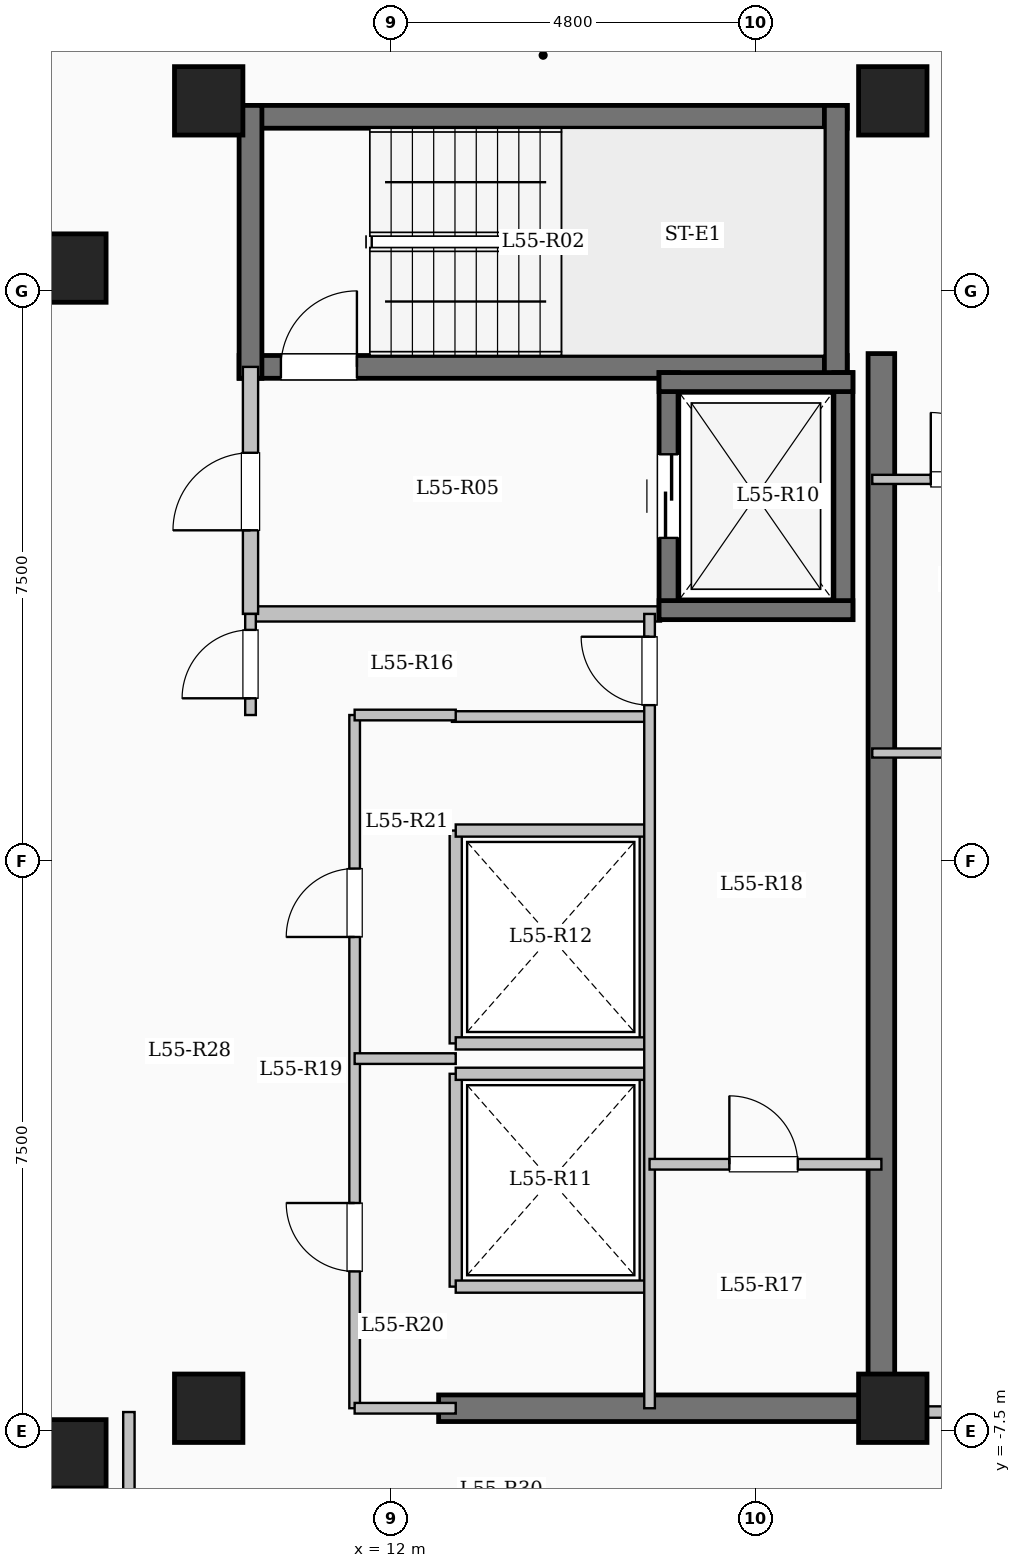
"""IFC4 building model, lengths in metres.
Left out: names, types, materials, properties, quantities, classifications, styles, units other than length and angle.
Written with IfcOpenShell. Run it as: python <this file> out.ifc"""

import sys

from ifc_helpers import new_model, si_unit, direction, frame, frame_2d, origin, origin_2d, place, context, subcontext, project, spatial, rectangle, extrude, element, fill, save


model = new_model("IFC4")
c1 = context("Model", 3, precision=1e-05, world=origin(), true_north=direction((0.0, 1.0)))
c2 = subcontext(c1, "Body", "Model", "MODEL_VIEW")
j1 = project(units=[si_unit("LENGTHUNIT", "METRE"), si_unit("PLANEANGLEUNIT", "RADIAN")], contexts=[c1])
p1 = place(None, origin())
s1 = spatial("IfcSite", under=j1, at=p1, CompositionType="ELEMENT")
p2 = place(p1, origin())
s2 = spatial("IfcBuilding", under=s1, at=p2, CompositionType="ELEMENT")
p3 = place(p2, frame((0.0, 0.0, 203.65)))
s3 = spatial("IfcBuildingStorey", under=s2, at=p3, CompositionType="ELEMENT", Elevation=203.65)
for number, where, z_axis, x_axis in (
    (1, (7.8, -7.8, 0.0), (0.0, 0.0, 1.0), (1.0, 0.0, 0.0)),
    (2, (7.8, 7.8, 0.0), (0.0, 0.0, 1.0), (1.0, 0.0, 0.0)),
    (3, (9.6, -7.2, 0.0), (0.0, 0.0, 1.0), (1.0, 0.0, 0.0)),
    (4, (9.6, 10.0, 0.0), (0.0, 0.0, 1.0), (1.0, 0.0, 0.0)),
    (5, (18.6, -7.2, 0.0), (0.0, 0.0, 1.0), (1.0, 0.0, 0.0)),
    (6, (18.6, 10.0, 0.0), (0.0, 0.0, 1.0), (1.0, 0.0, 0.0)),
):
    element("IfcColumn", number, at=place(p3, frame(where, z_axis=z_axis, x_axis=x_axis)), inside=s3, PredefinedType="COLUMN", context=c2, shape_type="SweptSolid", body=[
        extrude(rectangle(XDim=0.9, YDim=0.9, at=origin_2d()), origin(), (0.0, 0.0, 1.0), 3.35),
    ])
p4 = place(p3, frame((10.0, 9.79, 0.0), z_axis=(0.0, 0.0, 1.0), x_axis=(1.0, 0.0, 0.0)))
e7 = element("IfcWall", 7, at=p4, inside=s3, PredefinedType="SHEAR", context=c2, shape_type="SweptSolid", body=[
    extrude(rectangle(XDim=8.0, YDim=0.3, at=frame_2d((4.0, 0.0))), origin(), (0.0, 0.0, 1.0), 3.35),
])
p5 = place(p3, frame((10.0, 6.5, 0.0), z_axis=(0.0, 0.0, 1.0), x_axis=(1.0, 0.0, 0.0)))
e8 = element("IfcWall", 8, at=p5, inside=s3, PredefinedType="SHEAR", context=c2, shape_type="SweptSolid", body=[
    extrude(rectangle(XDim=8.0, YDim=0.3, at=frame_2d((4.0, 0.0))), origin(), (0.0, 0.0, 1.0), 3.35),
])
p6 = place(p5, frame((0.55, 0.0, 0.0)))
e9 = element("IfcOpeningElement", 9, at=p6, cuts=e8, PredefinedType="OPENING", context=c2, shape_type="SweptSolid", body=[
    extrude(rectangle(XDim=1.0, YDim=2.15, at=frame_2d((0.5, 1.075))), frame((0.0, 0.16, 0.0), z_axis=(0.0, -1.0, 0.0), x_axis=(1.0, 0.0, 0.0)), (0.0, 0.0, 1.0), 0.32),
])
for number, where, z_axis, x_axis in (
    (10, (10.15, 6.35, 0.0), (0.0, 0.0, 1.0), (0.0, 1.0, 0.0)),
    (11, (17.85, 6.35, 0.0), (0.0, 0.0, 1.0), (0.0, 1.0, 0.0)),
):
    element("IfcWall", number, at=place(p3, frame(where, z_axis=z_axis, x_axis=x_axis)), inside=s3, PredefinedType="SHEAR", context=c2, shape_type="SweptSolid", body=[
        extrude(rectangle(XDim=3.59, YDim=0.3, at=frame_2d((1.795, 0.0))), origin(), (0.0, 0.0, 1.0), 3.35),
    ])
p7 = place(p3, frame((10.15, 3.25, 0.0), z_axis=(0.0, 0.0, 1.0), x_axis=(1.0, 0.0, 0.0)))
e12 = element("IfcWall", 12, at=p7, inside=s3, PredefinedType="SOLIDWALL", context=c2, shape_type="SweptSolid", body=[
    extrude(rectangle(XDim=5.4, YDim=0.2, at=frame_2d((2.7, 0.0))), origin(), (0.0, 0.0, 1.0), 3.1),
])
p8 = place(p3, frame((10.15, 3.25, 0.0), z_axis=(0.0, 0.0, 1.0), x_axis=(0.0, 1.0, 0.0)))
e13 = element("IfcWall", 13, at=p8, inside=s3, PredefinedType="SOLIDWALL", context=c2, shape_type="SweptSolid", body=[
    extrude(rectangle(XDim=3.25, YDim=0.2, at=frame_2d((1.625, 0.0))), origin(), (0.0, 0.0, 1.0), 3.1),
])
p9 = place(p8, frame((1.1, 0.0, 0.0)))
e14 = element("IfcOpeningElement", 14, at=p9, cuts=e13, PredefinedType="OPENING", context=c2, shape_type="SweptSolid", body=[
    extrude(rectangle(XDim=1.02, YDim=2.15, at=frame_2d((0.51, 1.075))), frame((0.0, 0.11, 0.0), z_axis=(0.0, -1.0, 0.0), x_axis=(1.0, 0.0, 0.0)), (0.0, 0.0, 1.0), 0.22),
])
p10 = place(p3, frame((15.65, 3.175, 0.0), z_axis=(0.0, 0.0, 1.0), x_axis=(0.0, 1.0, 0.0)))
e15 = element("IfcWall", 15, at=p10, inside=s3, PredefinedType="SHEAR", context=c2, shape_type="SweptSolid", body=[
    extrude(rectangle(XDim=3.25, YDim=0.25, at=frame_2d((1.625, 0.0))), origin(), (0.0, 0.0, 1.0), 3.35),
])
p11 = place(p10, frame((1.075, 0.0, 0.0)))
e16 = element("IfcOpeningElement", 16, at=p11, cuts=e15, PredefinedType="OPENING", context=c2, shape_type="SweptSolid", body=[
    extrude(rectangle(XDim=1.1, YDim=2.15, at=frame_2d((0.55, 1.075))), frame((0.0, 0.135, 0.0), z_axis=(0.0, -1.0, 0.0), x_axis=(1.0, 0.0, 0.0)), (0.0, 0.0, 1.0), 0.27),
])
p12 = place(p3, frame((17.95, 3.175, 0.0), z_axis=(0.0, 0.0, 1.0), x_axis=(0.0, 1.0, 0.0)))
e17 = element("IfcWall", 17, at=p12, inside=s3, PredefinedType="SHEAR", context=c2, shape_type="SweptSolid", body=[
    extrude(rectangle(XDim=3.25, YDim=0.25, at=frame_2d((1.625, 0.0))), origin(), (0.0, 0.0, 1.0), 3.35),
])
for number, where, z_axis, x_axis in (
    (18, (15.525, 3.3, 0.0), (0.0, 0.0, 1.0), (1.0, 0.0, 0.0)),
    (19, (15.525, 6.3, 0.0), (0.0, 0.0, 1.0), (1.0, 0.0, 0.0)),
):
    element("IfcWall", number, at=place(p3, frame(where, z_axis=z_axis, x_axis=x_axis)), inside=s3, PredefinedType="SHEAR", context=c2, shape_type="SweptSolid", body=[
        extrude(rectangle(XDim=2.55, YDim=0.25, at=frame_2d((1.275, 0.0))), origin(), (0.0, 0.0, 1.0), 3.35),
    ])
for number, where, z_axis, x_axis in (
    (20, (12.85, -5.6, 0.0), (0.0, 0.0, 1.0), (0.0, 1.0, 0.0)),
    (21, (15.35, -5.6, 0.0), (0.0, 0.0, 1.0), (0.0, 1.0, 0.0)),
):
    element("IfcWall", number, at=place(p3, frame(where, z_axis=z_axis, x_axis=x_axis)), inside=s3, PredefinedType="SOLIDWALL", context=c2, shape_type="SweptSolid", body=[
        extrude(rectangle(XDim=2.8, YDim=0.16, at=frame_2d((1.4, 0.0))), origin(), (0.0, 0.0, 1.0), 3.1),
    ])
for number, where, z_axis, x_axis in (
    (22, (12.85, -5.6, 0.0), (0.0, 0.0, 1.0), (1.0, 0.0, 0.0)),
    (23, (12.85, -2.8, 0.0), (0.0, 0.0, 1.0), (1.0, 0.0, 0.0)),
):
    element("IfcWall", number, at=place(p3, frame(where, z_axis=z_axis, x_axis=x_axis)), inside=s3, PredefinedType="SOLIDWALL", context=c2, shape_type="SweptSolid", body=[
        extrude(rectangle(XDim=2.5, YDim=0.16, at=frame_2d((1.25, 0.0))), origin(), (0.0, 0.0, 1.0), 3.1),
    ])
for number, where, z_axis, x_axis in (
    (24, (12.85, -2.4, 0.0), (0.0, 0.0, 1.0), (0.0, 1.0, 0.0)),
    (25, (15.35, -2.4, 0.0), (0.0, 0.0, 1.0), (0.0, 1.0, 0.0)),
):
    element("IfcWall", number, at=place(p3, frame(where, z_axis=z_axis, x_axis=x_axis)), inside=s3, PredefinedType="SOLIDWALL", context=c2, shape_type="SweptSolid", body=[
        extrude(rectangle(XDim=2.8, YDim=0.16, at=frame_2d((1.4, 0.0))), origin(), (0.0, 0.0, 1.0), 3.1),
    ])
for number, where, z_axis, x_axis in (
    (26, (12.85, -2.4, 0.0), (0.0, 0.0, 1.0), (1.0, 0.0, 0.0)),
    (27, (12.85, 0.4, 0.0), (0.0, 0.0, 1.0), (1.0, 0.0, 0.0)),
):
    element("IfcWall", number, at=place(p3, frame(where, z_axis=z_axis, x_axis=x_axis)), inside=s3, PredefinedType="SOLIDWALL", context=c2, shape_type="SweptSolid", body=[
        extrude(rectangle(XDim=2.5, YDim=0.16, at=frame_2d((1.25, 0.0))), origin(), (0.0, 0.0, 1.0), 3.1),
    ])
p13 = place(p3, frame((18.45, -7.375, 0.0), z_axis=(0.0, 0.0, 1.0), x_axis=(0.0, 1.0, 0.0)))
e28 = element("IfcWall", 28, at=p13, inside=s3, PredefinedType="SHEAR", context=c2, shape_type="SweptSolid", body=[
    extrude(rectangle(XDim=14.05, YDim=0.35, at=frame_2d((7.025, 0.0))), origin(), (0.0, 0.0, 1.0), 3.35),
])
p14 = place(p3, frame((12.625, -7.2, 0.0), z_axis=(0.0, 0.0, 1.0), x_axis=(1.0, 0.0, 0.0)))
e29 = element("IfcWall", 29, at=p14, inside=s3, PredefinedType="SHEAR", context=c2, shape_type="SweptSolid", body=[
    extrude(rectangle(XDim=6.0, YDim=0.35, at=frame_2d((3.0, 0.0))), origin(), (0.0, 0.0, 1.0), 3.35),
])
p15 = place(p3, frame((12.8, 1.9, 0.0), z_axis=(0.0, 0.0, 1.0), x_axis=(1.0, 0.0, 0.0)))
e30 = element("IfcWall", 30, at=p15, inside=s3, PredefinedType="PARTITIONING", context=c2, shape_type="SweptSolid", body=[
    extrude(rectangle(XDim=2.6, YDim=0.14, at=frame_2d((1.3, 0.0))), origin(), (0.0, 0.0, 1.0), 3.1),
])
p16 = place(p3, frame((10.15, 1.92, 0.0), z_axis=(0.0, 0.0, 1.0), x_axis=(0.0, 1.0, 0.0)))
e31 = element("IfcWall", 31, at=p16, inside=s3, PredefinedType="PARTITIONING", context=c2, shape_type="SweptSolid", body=[
    extrude(rectangle(XDim=1.33, YDim=0.14, at=frame_2d((0.665, 0.0))), origin(), (0.0, 0.0, 1.0), 3.1),
])
p17 = place(p16, frame((0.22, 0.0, 0.0)))
e32 = element("IfcOpeningElement", 32, at=p17, cuts=e31, PredefinedType="OPENING", context=c2, shape_type="SweptSolid", body=[
    extrude(rectangle(XDim=0.9, YDim=2.08, at=frame_2d((0.45, 1.04))), frame((0.0, 0.08, 0.0), z_axis=(0.0, -1.0, 0.0), x_axis=(1.0, 0.0, 0.0)), (0.0, 0.0, 1.0), 0.16),
])
p18 = place(p3, frame((15.4, -7.2, 0.0), z_axis=(0.0, 0.0, 1.0), x_axis=(0.0, 1.0, 0.0)))
e33 = element("IfcWall", 33, at=p18, inside=s3, PredefinedType="PARTITIONING", context=c2, shape_type="SweptSolid", body=[
    extrude(rectangle(XDim=10.45, YDim=0.14, at=frame_2d((5.225, 0.0))), origin(), (0.0, 0.0, 1.0), 3.1),
])
p19 = place(p18, frame((9.25, 0.0, 0.0)))
e34 = element("IfcOpeningElement", 34, at=p19, cuts=e33, PredefinedType="OPENING", context=c2, shape_type="SweptSolid", body=[
    extrude(rectangle(XDim=0.9, YDim=2.08, at=frame_2d((0.45, 1.04))), frame((0.0, 0.08, 0.0), z_axis=(0.0, -1.0, 0.0), x_axis=(1.0, 0.0, 0.0)), (0.0, 0.0, 1.0), 0.16),
])
p20 = place(p3, frame((15.4, -3.99, 0.0), z_axis=(0.0, 0.0, 1.0), x_axis=(1.0, 0.0, 0.0)))
e35 = element("IfcWall", 35, at=p20, inside=s3, PredefinedType="PARTITIONING", context=c2, shape_type="SweptSolid", body=[
    extrude(rectangle(XDim=3.05, YDim=0.14, at=frame_2d((1.525, 0.0))), origin(), (0.0, 0.0, 1.0), 3.1),
])
p21 = place(p20, frame((1.05, 0.0, 0.0)))
e36 = element("IfcOpeningElement", 36, at=p21, cuts=e35, PredefinedType="OPENING", context=c2, shape_type="SweptSolid", body=[
    extrude(rectangle(XDim=0.9, YDim=2.08, at=frame_2d((0.45, 1.04))), frame((0.0, 0.08, 0.0), z_axis=(0.0, -1.0, 0.0), x_axis=(1.0, 0.0, 0.0)), (0.0, 0.0, 1.0), 0.16),
])
p22 = place(p3, frame((11.52, -7.2, 0.0), z_axis=(0.0, 0.0, 1.0), x_axis=(0.0, 1.0, 0.0)))
e37 = element("IfcWall", 37, at=p22, inside=s3, PredefinedType="PARTITIONING", context=c2, shape_type="SweptSolid", body=[
    extrude(rectangle(XDim=9.12, YDim=0.14, at=frame_2d((4.56, 0.0))), origin(), (0.0, 0.0, 1.0), 3.1),
])
p23 = place(p22, frame((1.8, 0.0, 0.0)))
e38 = element("IfcOpeningElement", 38, at=p23, cuts=e37, PredefinedType="OPENING", context=c2, shape_type="SweptSolid", body=[
    extrude(rectangle(XDim=0.9, YDim=2.08, at=frame_2d((0.45, 1.04))), frame((0.0, 0.08, 0.0), z_axis=(0.0, -1.0, 0.0), x_axis=(1.0, 0.0, 0.0)), (0.0, 0.0, 1.0), 0.16),
])
p24 = place(p22, frame((6.2, 0.0, 0.0)))
e39 = element("IfcOpeningElement", 39, at=p24, cuts=e37, PredefinedType="OPENING", context=c2, shape_type="SweptSolid", body=[
    extrude(rectangle(XDim=0.9, YDim=2.08, at=frame_2d((0.45, 1.04))), frame((0.0, 0.08, 0.0), z_axis=(0.0, -1.0, 0.0), x_axis=(1.0, 0.0, 0.0)), (0.0, 0.0, 1.0), 0.16),
])
p25 = place(p3, frame((11.52, 1.92, 0.0), z_axis=(0.0, 0.0, 1.0), x_axis=(1.0, 0.0, 0.0)))
e40 = element("IfcWall", 40, at=p25, inside=s3, PredefinedType="PARTITIONING", context=c2, shape_type="SweptSolid", body=[
    extrude(rectangle(XDim=1.33, YDim=0.14, at=frame_2d((0.665, 0.0))), origin(), (0.0, 0.0, 1.0), 3.1),
])
p26 = place(p3, frame((11.52, -7.2, 0.0), z_axis=(0.0, 0.0, 1.0), x_axis=(1.0, 0.0, 0.0)))
e41 = element("IfcWall", 41, at=p26, inside=s3, PredefinedType="PARTITIONING", context=c2, shape_type="SweptSolid", body=[
    extrude(rectangle(XDim=1.33, YDim=0.14, at=frame_2d((0.665, 0.0))), origin(), (0.0, 0.0, 1.0), 2.235),
])
p27 = place(p3, frame((11.52, -2.6, 0.0), z_axis=(0.0, 0.0, 1.0), x_axis=(1.0, 0.0, 0.0)))
e42 = element("IfcWall", 42, at=p27, inside=s3, PredefinedType="PARTITIONING", context=c2, shape_type="SweptSolid", body=[
    extrude(rectangle(XDim=1.33, YDim=0.14, at=frame_2d((0.665, 0.0))), origin(), (0.0, 0.0, 1.0), 3.1),
])
p28 = place(p3, frame((8.55, -9.4, 0.0), z_axis=(0.0, 0.0, 1.0), x_axis=(0.0, 1.0, 0.0)))
e43 = element("IfcWall", 43, at=p28, inside=s3, PredefinedType="PARTITIONING", context=c2, shape_type="SweptSolid", body=[
    extrude(rectangle(XDim=2.15, YDim=0.15, at=frame_2d((1.075, 0.0))), origin(), (0.0, 0.0, 1.0), 3.1),
])
p29 = place(p3, frame((18.45, -7.25, 0.0), z_axis=(0.0, 0.0, 1.0), x_axis=(1.0, 0.0, 0.0)))
e44 = element("IfcWall", 44, at=p29, inside=s3, PredefinedType="PARTITIONING", context=c2, shape_type="SweptSolid", body=[
    extrude(rectangle(XDim=5.13, YDim=0.15, at=frame_2d((2.565, 0.0))), origin(), (0.0, 0.0, 1.0), 3.1),
])
p30 = place(p29, frame((1.95, 0.0, 0.0)))
e45 = element("IfcOpeningElement", 45, at=p30, cuts=e44, PredefinedType="OPENING", context=c2, shape_type="SweptSolid", body=[
    extrude(rectangle(XDim=0.96, YDim=2.15, at=frame_2d((0.48, 1.075))), frame((0.0, 0.085, 0.0), z_axis=(0.0, -1.0, 0.0), x_axis=(1.0, 0.0, 0.0)), (0.0, 0.0, 1.0), 0.17),
])
p31 = place(p3, frame((18.33, 1.42, 0.0), z_axis=(0.0, 0.0, 1.0), x_axis=(1.0, 0.0, 0.0)))
e46 = element("IfcWall", 46, at=p31, inside=s3, PredefinedType="PARTITIONING", context=c2, shape_type="SweptSolid", body=[
    extrude(rectangle(XDim=5.37, YDim=0.12, at=frame_2d((2.685, 0.0))), origin(), (0.0, 0.0, 1.0), 3.1),
])
p32 = place(p31, frame((1.038, 0.0, 0.0)))
e47 = element("IfcOpeningElement", 47, at=p32, cuts=e46, PredefinedType="OPENING", context=c2, shape_type="SweptSolid", body=[
    extrude(rectangle(XDim=0.88, YDim=2.1, at=frame_2d((0.44, 1.05))), frame((0.0, 0.07, 0.0), z_axis=(0.0, -1.0, 0.0), x_axis=(1.0, 0.0, 0.0)), (0.0, 0.0, 1.0), 0.14),
])
p33 = place(p31, frame((3.553, 0.0, 0.0)))
e48 = element("IfcOpeningElement", 48, at=p33, cuts=e46, PredefinedType="OPENING", context=c2, shape_type="SweptSolid", body=[
    extrude(rectangle(XDim=0.88, YDim=2.1, at=frame_2d((0.44, 1.05))), frame((0.0, 0.07, 0.0), z_axis=(0.0, -1.0, 0.0), x_axis=(1.0, 0.0, 0.0)), (0.0, 0.0, 1.0), 0.14),
])
p34 = place(p3, frame((18.33, 5.02, 0.0), z_axis=(0.0, 0.0, 1.0), x_axis=(1.0, 0.0, 0.0)))
e49 = element("IfcWall", 49, at=p34, inside=s3, PredefinedType="PARTITIONING", context=c2, shape_type="SweptSolid", body=[
    extrude(rectangle(XDim=5.37, YDim=0.12, at=frame_2d((2.685, 0.0))), origin(), (0.0, 0.0, 1.0), 3.1),
])
p35 = place(p34, frame((0.77, 0.0, 0.0)))
e50 = element("IfcOpeningElement", 50, at=p35, cuts=e49, PredefinedType="OPENING", context=c2, shape_type="SweptSolid", body=[
    extrude(rectangle(XDim=0.88, YDim=2.1, at=frame_2d((0.44, 1.05))), frame((0.0, 0.07, 0.0), z_axis=(0.0, -1.0, 0.0), x_axis=(1.0, 0.0, 0.0)), (0.0, 0.0, 1.0), 0.14),
])
p36 = place(p6, origin())
e51 = element("IfcDoor", 51, at=p36, inside=s3, OperationType="SINGLE_SWING_RIGHT", PredefinedType="DOOR", context=c2, shape_type="SweptSolid", body=[
    extrude(rectangle(XDim=1.0, YDim=2.15, at=frame_2d((0.5, 1.075))), frame((0.0, 0.025, 0.0), z_axis=(0.0, -1.0, 0.0), x_axis=(1.0, 0.0, 0.0)), (0.0, 0.0, 1.0), 0.05),
])
fill(e9, e51)
p37 = place(p9, origin())
e52 = element("IfcDoor", 52, at=p37, inside=s3, OperationType="SINGLE_SWING_LEFT", PredefinedType="DOOR", context=c2, shape_type="SweptSolid", body=[
    extrude(rectangle(XDim=1.02, YDim=2.15, at=frame_2d((0.51, 1.075))), frame((0.0, 0.025, 0.0), z_axis=(0.0, -1.0, 0.0), x_axis=(1.0, 0.0, 0.0)), (0.0, 0.0, 1.0), 0.05),
])
fill(e14, e52)
p38 = place(p11, origin())
e53 = element("IfcDoor", 53, at=p38, inside=s3, OperationType="SLIDING_TO_LEFT", PredefinedType="DOOR", context=c2, shape_type="SweptSolid", body=[
    extrude(rectangle(XDim=1.1, YDim=2.15, at=frame_2d((0.55, 1.075))), frame((0.0, 0.025, 0.0), z_axis=(0.0, -1.0, 0.0), x_axis=(1.0, 0.0, 0.0)), (0.0, 0.0, 1.0), 0.05),
])
fill(e16, e53)
p39 = place(p17, origin())
e54 = element("IfcDoor", 54, at=p39, inside=s3, OperationType="SINGLE_SWING_LEFT", PredefinedType="DOOR", context=c2, shape_type="SweptSolid", body=[
    extrude(rectangle(XDim=0.9, YDim=2.08, at=frame_2d((0.45, 1.04))), frame((0.0, 0.025, 0.0), z_axis=(0.0, -1.0, 0.0), x_axis=(1.0, 0.0, 0.0)), (0.0, 0.0, 1.0), 0.05),
])
fill(e32, e54)
p40 = place(p19, origin())
e55 = element("IfcDoor", 55, at=p40, inside=s3, OperationType="SINGLE_SWING_RIGHT", PredefinedType="DOOR", context=c2, shape_type="SweptSolid", body=[
    extrude(rectangle(XDim=0.9, YDim=2.08, at=frame_2d((0.45, 1.04))), frame((0.0, 0.025, 0.0), z_axis=(0.0, -1.0, 0.0), x_axis=(1.0, 0.0, 0.0)), (0.0, 0.0, 1.0), 0.05),
])
fill(e34, e55)
p41 = place(p21, origin())
e56 = element("IfcDoor", 56, at=p41, inside=s3, OperationType="SINGLE_SWING_LEFT", PredefinedType="DOOR", context=c2, shape_type="SweptSolid", body=[
    extrude(rectangle(XDim=0.9, YDim=2.08, at=frame_2d((0.45, 1.04))), frame((0.0, 0.025, 0.0), z_axis=(0.0, -1.0, 0.0), x_axis=(1.0, 0.0, 0.0)), (0.0, 0.0, 1.0), 0.05),
])
fill(e36, e56)
p42 = place(p23, origin())
e57 = element("IfcDoor", 57, at=p42, inside=s3, OperationType="SINGLE_SWING_RIGHT", PredefinedType="DOOR", context=c2, shape_type="SweptSolid", body=[
    extrude(rectangle(XDim=0.9, YDim=2.08, at=frame_2d((0.45, 1.04))), frame((0.0, 0.025, 0.0), z_axis=(0.0, -1.0, 0.0), x_axis=(1.0, 0.0, 0.0)), (0.0, 0.0, 1.0), 0.05),
])
fill(e38, e57)
p43 = place(p24, origin())
e58 = element("IfcDoor", 58, at=p43, inside=s3, OperationType="SINGLE_SWING_LEFT", PredefinedType="DOOR", context=c2, shape_type="SweptSolid", body=[
    extrude(rectangle(XDim=0.9, YDim=2.08, at=frame_2d((0.45, 1.04))), frame((0.0, 0.025, 0.0), z_axis=(0.0, -1.0, 0.0), x_axis=(1.0, 0.0, 0.0)), (0.0, 0.0, 1.0), 0.05),
])
fill(e39, e58)
p44 = place(p35, origin())
e59 = element("IfcDoor", 59, at=p44, inside=s3, OperationType="SINGLE_SWING_LEFT", PredefinedType="DOOR", context=c2, shape_type="SweptSolid", body=[
    extrude(rectangle(XDim=0.88, YDim=2.1, at=frame_2d((0.44, 1.05))), frame((0.0, 0.025, 0.0), z_axis=(0.0, -1.0, 0.0), x_axis=(1.0, 0.0, 0.0)), (0.0, 0.0, 1.0), 0.05),
])
fill(e50, e59)
save(model, sys.argv[1])
